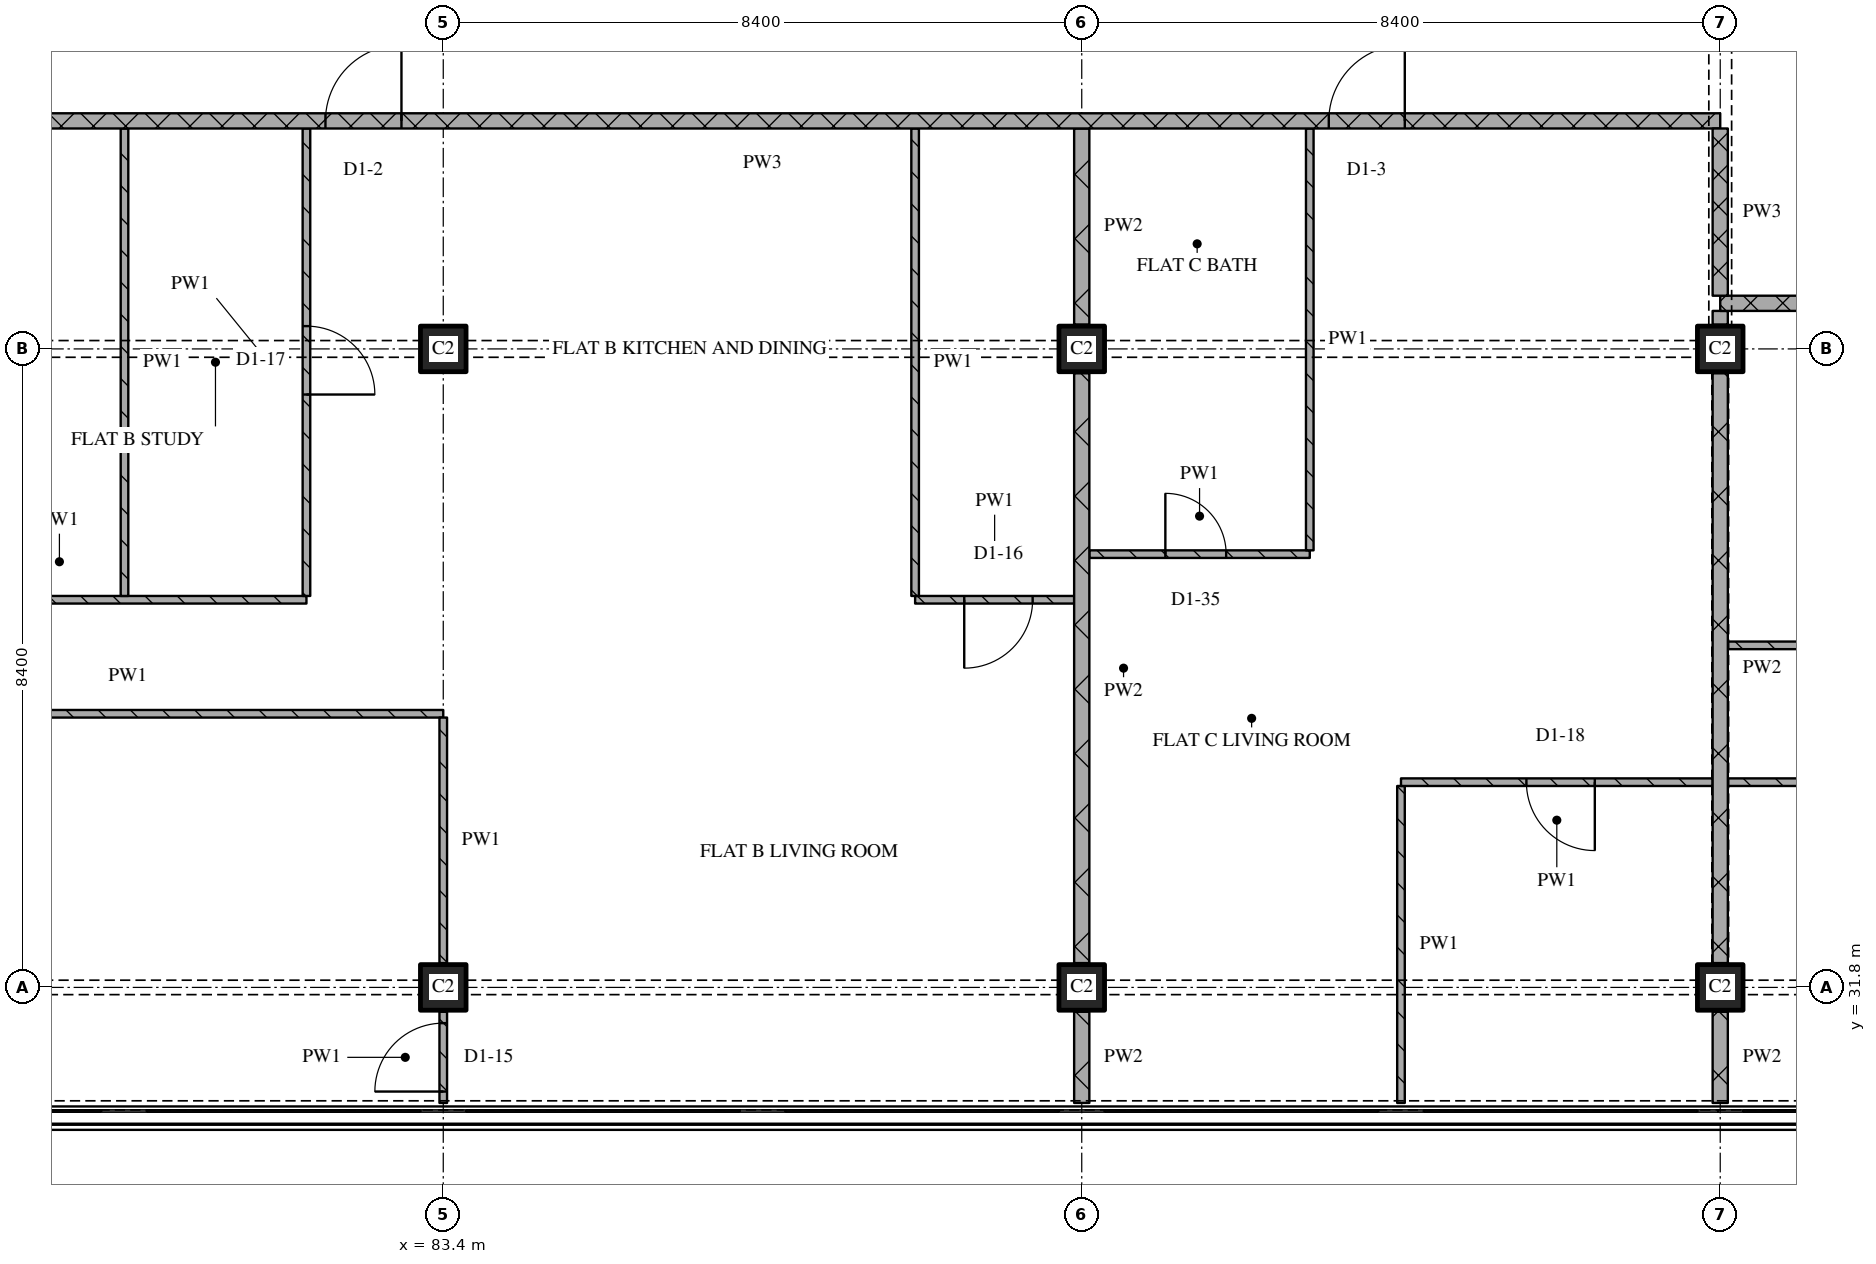
"""IFC4 building model, lengths in metres.
Left out: names, types, materials, properties, quantities, classifications, styles, units other than length and angle.
Written with IfcOpenShell. Run it as: python <this file> out.ifc"""

import sys

from ifc_helpers import new_model, si_unit, direction, frame, frame_2d, origin, origin_2d, place, context, subcontext, project, spatial, rectangle, extrude, element, fill, save


model = new_model("IFC4")
c1 = context("Model", 3, precision=1e-05, world=origin(), true_north=direction((0.0, 1.0)))
c2 = subcontext(c1, "Body", "Model", "MODEL_VIEW")
j1 = project(units=[si_unit("LENGTHUNIT", "METRE"), si_unit("PLANEANGLEUNIT", "RADIAN")], contexts=[c1])
p1 = place(None, origin())
s1 = spatial("IfcSite", under=j1, at=p1, CompositionType="ELEMENT")
p2 = place(p1, origin())
s2 = spatial("IfcBuilding", under=s1, at=p2, CompositionType="ELEMENT")
p3 = place(p2, frame((0.0, 0.0, 212.7)))
s3 = spatial("IfcBuildingStorey", under=s2, at=p3, CompositionType="ELEMENT", Elevation=212.7)
for number, where, z_axis, x_axis in (
    (1, (83.4, 31.8, 0.0), (0.0, 0.0, 1.0), (1.0, 0.0, 0.0)),
    (2, (83.4, 40.2, 0.0), (0.0, 0.0, 1.0), (1.0, 0.0, 0.0)),
    (3, (91.8, 31.8, 0.0), (0.0, 0.0, 1.0), (1.0, 0.0, 0.0)),
    (4, (91.8, 40.2, 0.0), (0.0, 0.0, 1.0), (1.0, 0.0, 0.0)),
    (5, (100.2, 31.8, 0.0), (0.0, 0.0, 1.0), (1.0, 0.0, 0.0)),
    (6, (100.2, 40.2, 0.0), (0.0, 0.0, 1.0), (1.0, 0.0, 0.0)),
):
    element("IfcColumn", number, at=place(p3, frame(where, z_axis=z_axis, x_axis=x_axis)), inside=s3, PredefinedType="COLUMN", context=c2, shape_type="SweptSolid", body=[
        extrude(rectangle(XDim=0.6, YDim=0.6, at=origin_2d()), origin(), (0.0, 0.0, 1.0), 3.6),
    ])
p4 = place(p3, frame((75.1, 35.4, 0.0), z_axis=(0.0, 0.0, 1.0), x_axis=(1.0, 0.0, 0.0)))
e7 = element("IfcWall", 7, at=p4, inside=s3, PredefinedType="PARTITIONING", context=c2, shape_type="SweptSolid", body=[
    extrude(rectangle(XDim=8.3, YDim=0.1, at=frame_2d((4.15, 0.0))), origin(), (0.0, 0.0, 1.0), 3.32),
])
p5 = place(p3, frame((100.3, 36.3, 0.0), z_axis=(0.0, 0.0, 1.0), x_axis=(1.0, 0.0, 0.0)))
e8 = element("IfcWall", 8, at=p5, inside=s3, PredefinedType="PARTITIONING", context=c2, shape_type="SweptSolid", body=[
    extrude(rectangle(XDim=11.3, YDim=0.1, at=frame_2d((5.65, 0.0))), origin(), (0.0, 0.0, 1.0), 3.32),
])
p6 = place(p5, frame((1.75, 0.0, 0.0)))
e9 = element("IfcOpeningElement", 9, at=p6, cuts=e8, PredefinedType="OPENING", context=c2, shape_type="SweptSolid", body=[
    extrude(rectangle(XDim=0.8, YDim=2.1, at=frame_2d((0.4, 1.05))), frame((0.0, 0.06, 0.0), z_axis=(0.0, -1.0, 0.0), x_axis=(1.0, 0.0, 0.0)), (0.0, 0.0, 1.0), 0.12),
])
p7 = place(p5, frame((6.25, 0.0, 0.0)))
e10 = element("IfcOpeningElement", 10, at=p7, cuts=e8, PredefinedType="OPENING", context=c2, shape_type="SweptSolid", body=[
    extrude(rectangle(XDim=0.8, YDim=2.1, at=frame_2d((0.4, 1.05))), frame((0.0, 0.06, 0.0), z_axis=(0.0, -1.0, 0.0), x_axis=(1.0, 0.0, 0.0)), (0.0, 0.0, 1.0), 0.12),
])
p8 = place(p3, frame((75.1, 36.9, 0.0), z_axis=(0.0, 0.0, 1.0), x_axis=(1.0, 0.0, 0.0)))
e11 = element("IfcWall", 11, at=p8, inside=s3, PredefinedType="PARTITIONING", context=c2, shape_type="SweptSolid", body=[
    extrude(rectangle(XDim=6.5, YDim=0.1, at=frame_2d((3.25, 0.0))), origin(), (0.0, 0.0, 1.0), 3.32),
])
p9 = place(p8, frame((1.603, 0.0, 0.0)))
e12 = element("IfcOpeningElement", 12, at=p9, cuts=e11, PredefinedType="OPENING", context=c2, shape_type="SweptSolid", body=[
    extrude(rectangle(XDim=0.8, YDim=2.1, at=frame_2d((0.4, 1.05))), frame((0.0, 0.06, 0.0), z_axis=(0.0, -1.0, 0.0), x_axis=(1.0, 0.0, 0.0)), (0.0, 0.0, 1.0), 0.12),
])
p10 = place(p3, frame((89.608, 36.9, 0.0), z_axis=(0.0, 0.0, 1.0), x_axis=(1.0, 0.0, 0.0)))
e13 = element("IfcWall", 13, at=p10, inside=s3, PredefinedType="PARTITIONING", context=c2, shape_type="SweptSolid", body=[
    extrude(rectangle(XDim=2.092, YDim=0.1, at=frame_2d((1.046, 0.0))), origin(), (0.0, 0.0, 1.0), 3.32),
])
p11 = place(p10, frame((0.646, 0.0, 0.0)))
e14 = element("IfcOpeningElement", 14, at=p11, cuts=e13, PredefinedType="OPENING", context=c2, shape_type="SweptSolid", body=[
    extrude(rectangle(XDim=0.9, YDim=2.1, at=frame_2d((0.45, 1.05))), frame((0.0, 0.06, 0.0), z_axis=(0.0, -1.0, 0.0), x_axis=(1.0, 0.0, 0.0)), (0.0, 0.0, 1.0), 0.12),
])
p12 = place(p3, frame((91.9, 37.5, 0.0), z_axis=(0.0, 0.0, 1.0), x_axis=(1.0, 0.0, 0.0)))
e15 = element("IfcWall", 15, at=p12, inside=s3, PredefinedType="PARTITIONING", context=c2, shape_type="SweptSolid", body=[
    extrude(rectangle(XDim=2.9, YDim=0.1, at=frame_2d((1.45, 0.0))), origin(), (0.0, 0.0, 1.0), 3.32),
])
p13 = place(p12, frame((1.0, 0.0, 0.0)))
e16 = element("IfcOpeningElement", 16, at=p13, cuts=e15, PredefinedType="OPENING", context=c2, shape_type="SweptSolid", body=[
    extrude(rectangle(XDim=0.8, YDim=2.1, at=frame_2d((0.4, 1.05))), frame((0.0, 0.06, 0.0), z_axis=(0.0, -1.0, 0.0), x_axis=(1.0, 0.0, 0.0)), (0.0, 0.0, 1.0), 0.12),
])
p14 = place(p3, frame((124.58, 40.8, 0.0), z_axis=(0.0, 0.0, 1.0), x_axis=(-1.0, 0.0, 0.0)))
e17 = element("IfcWall", 17, at=p14, inside=s3, PredefinedType="PARTITIONING", context=c2, shape_type="SweptSolid", body=[
    extrude(rectangle(XDim=24.38, YDim=0.2, at=frame_2d((12.19, 0.0))), origin(), (0.0, 0.0, 1.0), 3.32),
])
p15 = place(p14, frame((11.73, 0.0, 0.0)))
e18 = element("IfcOpeningElement", 18, at=p15, cuts=e17, PredefinedType="OPENING", context=c2, shape_type="SweptSolid", body=[
    extrude(rectangle(XDim=1.0, YDim=2.1, at=frame_2d((0.5, 1.05))), frame((0.0, 0.11, 0.0), z_axis=(0.0, -1.0, 0.0), x_axis=(1.0, 0.0, 0.0)), (0.0, 0.0, 1.0), 0.22),
])
p16 = place(p3, frame((100.2, 43.2, 0.0), z_axis=(0.0, 0.0, 1.0), x_axis=(-1.0, 0.0, 0.0)))
e19 = element("IfcWall", 19, at=p16, inside=s3, PredefinedType="PARTITIONING", context=c2, shape_type="SweptSolid", body=[
    extrude(rectangle(XDim=25.2, YDim=0.2, at=frame_2d((12.6, 0.0))), origin(), (0.0, 0.0, 1.0), 3.32),
])
p17 = place(p16, frame((4.15, 0.0, 0.0)))
e20 = element("IfcOpeningElement", 20, at=p17, cuts=e19, PredefinedType="OPENING", context=c2, shape_type="SweptSolid", body=[
    extrude(rectangle(XDim=1.0, YDim=2.1, at=frame_2d((0.5, 1.05))), frame((0.0, 0.11, 0.0), z_axis=(0.0, -1.0, 0.0), x_axis=(1.0, 0.0, 0.0)), (0.0, 0.0, 1.0), 0.22),
])
p18 = place(p16, frame((17.35, 0.0, 0.0)))
e21 = element("IfcOpeningElement", 21, at=p18, cuts=e19, PredefinedType="OPENING", context=c2, shape_type="SweptSolid", body=[
    extrude(rectangle(XDim=1.0, YDim=2.1, at=frame_2d((0.5, 1.05))), frame((0.0, 0.11, 0.0), z_axis=(0.0, -1.0, 0.0), x_axis=(1.0, 0.0, 0.0)), (0.0, 0.0, 1.0), 0.22),
])
p19 = place(p3, frame((79.206, 43.1, 0.0), z_axis=(0.0, 0.0, 1.0), x_axis=(0.0, -1.0, 0.0)))
e22 = element("IfcWall", 22, at=p19, inside=s3, PredefinedType="PARTITIONING", context=c2, shape_type="SweptSolid", body=[
    extrude(rectangle(XDim=6.15, YDim=0.1, at=frame_2d((3.075, 0.0))), origin(), (0.0, 0.0, 1.0), 3.32),
])
p20 = place(p3, frame((81.6, 36.95, 0.0), z_axis=(0.0, 0.0, 1.0), x_axis=(0.0, 1.0, 0.0)))
e23 = element("IfcWall", 23, at=p20, inside=s3, PredefinedType="PARTITIONING", context=c2, shape_type="SweptSolid", body=[
    extrude(rectangle(XDim=6.15, YDim=0.1, at=frame_2d((3.075, 0.0))), origin(), (0.0, 0.0, 1.0), 3.32),
])
p21 = place(p20, frame((2.65, 0.0, 0.0)))
e24 = element("IfcOpeningElement", 24, at=p21, cuts=e23, PredefinedType="OPENING", context=c2, shape_type="SweptSolid", body=[
    extrude(rectangle(XDim=0.9, YDim=2.1, at=frame_2d((0.45, 1.05))), frame((0.0, 0.06, 0.0), z_axis=(0.0, -1.0, 0.0), x_axis=(1.0, 0.0, 0.0)), (0.0, 0.0, 1.0), 0.12),
])
p22 = place(p3, frame((83.4, 30.28, 0.0), z_axis=(0.0, 0.0, 1.0), x_axis=(0.0, 1.0, 0.0)))
e25 = element("IfcWall", 25, at=p22, inside=s3, PredefinedType="PARTITIONING", context=c2, shape_type="SweptSolid", body=[
    extrude(rectangle(XDim=1.2, YDim=0.1, at=frame_2d((0.6, 0.0))), origin(), (0.0, 0.0, 1.0), 3.32),
])
p23 = place(p22, frame((0.15, 0.0, 0.0)))
e26 = element("IfcOpeningElement", 26, at=p23, cuts=e25, PredefinedType="OPENING", context=c2, shape_type="SweptSolid", body=[
    extrude(rectangle(XDim=0.9, YDim=2.1, at=frame_2d((0.45, 1.05))), frame((0.0, 0.06, 0.0), z_axis=(0.0, -1.0, 0.0), x_axis=(1.0, 0.0, 0.0)), (0.0, 0.0, 1.0), 0.12),
])
p24 = place(p3, frame((83.4, 35.35, 0.0), z_axis=(0.0, 0.0, 1.0), x_axis=(0.0, -1.0, 0.0)))
e27 = element("IfcWall", 27, at=p24, inside=s3, PredefinedType="PARTITIONING", context=c2, shape_type="SweptSolid", body=[
    extrude(rectangle(XDim=3.23, YDim=0.1, at=frame_2d((1.615, 0.0))), origin(), (0.0, 0.0, 1.0), 3.32),
])
p25 = place(p3, frame((89.608, 43.1, 0.0), z_axis=(0.0, 0.0, 1.0), x_axis=(0.0, -1.0, 0.0)))
e28 = element("IfcWall", 28, at=p25, inside=s3, PredefinedType="PARTITIONING", context=c2, shape_type="SweptSolid", body=[
    extrude(rectangle(XDim=6.15, YDim=0.1, at=frame_2d((3.075, 0.0))), origin(), (0.0, 0.0, 1.0), 3.32),
])
p26 = place(p3, frame((91.8, 31.48, 0.0), z_axis=(0.0, 0.0, 1.0), x_axis=(0.0, -1.0, 0.0)))
e29 = element("IfcWall", 29, at=p26, inside=s3, PredefinedType="PARTITIONING", context=c2, shape_type="SweptSolid", body=[
    extrude(rectangle(XDim=1.2, YDim=0.2, at=frame_2d((0.6, 0.0))), origin(), (0.0, 0.0, 1.0), 3.32),
])
p27 = place(p3, frame((91.8, 39.88, 0.0), z_axis=(0.0, 0.0, 1.0), x_axis=(0.0, -1.0, 0.0)))
e30 = element("IfcWall", 30, at=p27, inside=s3, PredefinedType="PARTITIONING", context=c2, shape_type="SweptSolid", body=[
    extrude(rectangle(XDim=7.76, YDim=0.2, at=frame_2d((3.88, 0.0))), origin(), (0.0, 0.0, 1.0), 3.32),
])
p28 = place(p3, frame((91.8, 43.1, 0.0), z_axis=(0.0, 0.0, 1.0), x_axis=(0.0, -1.0, 0.0)))
e31 = element("IfcWall", 31, at=p28, inside=s3, PredefinedType="PARTITIONING", context=c2, shape_type="SweptSolid", body=[
    extrude(rectangle(XDim=2.58, YDim=0.2, at=frame_2d((1.29, 0.0))), origin(), (0.0, 0.0, 1.0), 3.32),
])
p29 = place(p3, frame((94.8, 43.1, 0.0), z_axis=(0.0, 0.0, 1.0), x_axis=(0.0, -1.0, 0.0)))
e32 = element("IfcWall", 32, at=p29, inside=s3, PredefinedType="PARTITIONING", context=c2, shape_type="SweptSolid", body=[
    extrude(rectangle(XDim=5.55, YDim=0.1, at=frame_2d((2.775, 0.0))), origin(), (0.0, 0.0, 1.0), 3.32),
])
p30 = place(p3, frame((96.0, 34.45, 0.0), z_axis=(0.0, 0.0, 1.0), x_axis=(0.0, -1.0, 0.0)))
e33 = element("IfcWall", 33, at=p30, inside=s3, PredefinedType="PARTITIONING", context=c2, shape_type="SweptSolid", body=[
    extrude(rectangle(XDim=4.17, YDim=0.1, at=frame_2d((2.085, 0.0))), origin(), (0.0, 0.0, 1.0), 3.32),
])
p31 = place(p3, frame((100.2, 43.1, 0.0), z_axis=(0.0, 0.0, 1.0), x_axis=(0.0, -1.0, 0.0)))
e34 = element("IfcWall", 34, at=p31, inside=s3, PredefinedType="PARTITIONING", context=c2, shape_type="SweptSolid", body=[
    extrude(rectangle(XDim=2.2, YDim=0.2, at=frame_2d((1.1, 0.0))), origin(), (0.0, 0.0, 1.0), 2.53),
])
p32 = place(p3, frame((100.2, 31.48, 0.0), z_axis=(0.0, 0.0, 1.0), x_axis=(0.0, -1.0, 0.0)))
e35 = element("IfcWall", 35, at=p32, inside=s3, PredefinedType="PARTITIONING", context=c2, shape_type="SweptSolid", body=[
    extrude(rectangle(XDim=1.2, YDim=0.2, at=frame_2d((0.6, 0.0))), origin(), (0.0, 0.0, 1.0), 3.32),
])
p33 = place(p3, frame((100.2, 39.88, 0.0), z_axis=(0.0, 0.0, 1.0), x_axis=(0.0, -1.0, 0.0)))
e36 = element("IfcWall", 36, at=p33, inside=s3, PredefinedType="PARTITIONING", context=c2, shape_type="SweptSolid", body=[
    extrude(rectangle(XDim=7.76, YDim=0.2, at=frame_2d((3.88, 0.0))), origin(), (0.0, 0.0, 1.0), 2.72),
])
p34 = place(p3, frame((100.2, 40.7, 0.0), z_axis=(0.0, 0.0, 1.0), x_axis=(0.0, -1.0, 0.0)))
e37 = element("IfcWall", 37, at=p34, inside=s3, PredefinedType="PARTITIONING", context=c2, shape_type="SweptSolid", body=[
    extrude(rectangle(XDim=0.18, YDim=0.2, at=frame_2d((0.09, 0.0))), origin(), (0.0, 0.0, 1.0), 3.32),
])
p35 = place(p3, frame((100.1, 34.5, 0.0), z_axis=(0.0, 0.0, 1.0), x_axis=(-1.0, 0.0, 0.0)))
e38 = element("IfcWall", 38, at=p35, inside=s3, PredefinedType="PARTITIONING", context=c2, shape_type="SweptSolid", body=[
    extrude(rectangle(XDim=4.1, YDim=0.1, at=frame_2d((2.05, 0.0))), origin(), (0.0, 0.0, 1.0), 3.32),
])
p36 = place(p35, frame((1.55, 0.0, 0.0)))
e39 = element("IfcOpeningElement", 39, at=p36, cuts=e38, PredefinedType="OPENING", context=c2, shape_type="SweptSolid", body=[
    extrude(rectangle(XDim=0.9, YDim=2.1, at=frame_2d((0.45, 1.05))), frame((0.0, 0.06, 0.0), z_axis=(0.0, -1.0, 0.0), x_axis=(1.0, 0.0, 0.0)), (0.0, 0.0, 1.0), 0.12),
])
p37 = place(p3, frame((117.0, 34.5, 0.0), z_axis=(0.0, 0.0, 1.0), x_axis=(-1.0, 0.0, 0.0)))
e40 = element("IfcWall", 40, at=p37, inside=s3, PredefinedType="PARTITIONING", context=c2, shape_type="SweptSolid", body=[
    extrude(rectangle(XDim=16.7, YDim=0.1, at=frame_2d((8.35, 0.0))), origin(), (0.0, 0.0, 1.0), 3.32),
])
p38 = place(p37, frame((12.15, 0.0, 0.0)))
e41 = element("IfcOpeningElement", 41, at=p38, cuts=e40, PredefinedType="OPENING", context=c2, shape_type="SweptSolid", body=[
    extrude(rectangle(XDim=0.9, YDim=2.1, at=frame_2d((0.45, 1.05))), frame((0.0, 0.06, 0.0), z_axis=(0.0, -1.0, 0.0), x_axis=(1.0, 0.0, 0.0)), (0.0, 0.0, 1.0), 0.12),
])
p39 = place(p11, origin())
e42 = element("IfcDoor", 42, at=p39, inside=s3, OperationType="SINGLE_SWING_RIGHT", PredefinedType="DOOR", context=c2, shape_type="SweptSolid", body=[
    extrude(rectangle(XDim=0.9, YDim=2.1, at=frame_2d((0.45, 1.05))), frame((0.0, 0.025, 0.0), z_axis=(0.0, -1.0, 0.0), x_axis=(1.0, 0.0, 0.0)), (0.0, 0.0, 1.0), 0.05),
])
fill(e14, e42)
p40 = place(p13, origin())
e43 = element("IfcDoor", 43, at=p40, inside=s3, OperationType="SINGLE_SWING_LEFT", PredefinedType="DOOR", context=c2, shape_type="SweptSolid", body=[
    extrude(rectangle(XDim=0.8, YDim=2.1, at=frame_2d((0.4, 1.05))), frame((0.0, 0.025, 0.0), z_axis=(0.0, -1.0, 0.0), x_axis=(1.0, 0.0, 0.0)), (0.0, 0.0, 1.0), 0.05),
])
fill(e16, e43)
p41 = place(p17, origin())
e44 = element("IfcDoor", 44, at=p41, inside=s3, OperationType="SINGLE_SWING_RIGHT", PredefinedType="DOOR", context=c2, shape_type="SweptSolid", body=[
    extrude(rectangle(XDim=1.0, YDim=2.1, at=frame_2d((0.5, 1.05))), frame((0.0, 0.025, 0.0), z_axis=(0.0, -1.0, 0.0), x_axis=(1.0, 0.0, 0.0)), (0.0, 0.0, 1.0), 0.05),
])
fill(e20, e44)
p42 = place(p18, origin())
e45 = element("IfcDoor", 45, at=p42, inside=s3, OperationType="SINGLE_SWING_RIGHT", PredefinedType="DOOR", context=c2, shape_type="SweptSolid", body=[
    extrude(rectangle(XDim=1.0, YDim=2.1, at=frame_2d((0.5, 1.05))), frame((0.0, 0.025, 0.0), z_axis=(0.0, -1.0, 0.0), x_axis=(1.0, 0.0, 0.0)), (0.0, 0.0, 1.0), 0.05),
])
fill(e21, e45)
p43 = place(p21, origin())
e46 = element("IfcDoor", 46, at=p43, inside=s3, OperationType="SINGLE_SWING_RIGHT", PredefinedType="DOOR", context=c2, shape_type="SweptSolid", body=[
    extrude(rectangle(XDim=0.9, YDim=2.1, at=frame_2d((0.45, 1.05))), frame((0.0, 0.025, 0.0), z_axis=(0.0, -1.0, 0.0), x_axis=(1.0, 0.0, 0.0)), (0.0, 0.0, 1.0), 0.05),
])
fill(e24, e46)
p44 = place(p23, origin())
e47 = element("IfcDoor", 47, at=p44, inside=s3, OperationType="SINGLE_SWING_LEFT", PredefinedType="DOOR", context=c2, shape_type="SweptSolid", body=[
    extrude(rectangle(XDim=0.9, YDim=2.1, at=frame_2d((0.45, 1.05))), frame((0.0, 0.025, 0.0), z_axis=(0.0, -1.0, 0.0), x_axis=(1.0, 0.0, 0.0)), (0.0, 0.0, 1.0), 0.05),
])
fill(e26, e47)
p45 = place(p36, origin())
e48 = element("IfcDoor", 48, at=p45, inside=s3, OperationType="SINGLE_SWING_LEFT", PredefinedType="DOOR", context=c2, shape_type="SweptSolid", body=[
    extrude(rectangle(XDim=0.9, YDim=2.1, at=frame_2d((0.45, 1.05))), frame((0.0, 0.025, 0.0), z_axis=(0.0, -1.0, 0.0), x_axis=(1.0, 0.0, 0.0)), (0.0, 0.0, 1.0), 0.05),
])
fill(e39, e48)
save(model, sys.argv[1])
